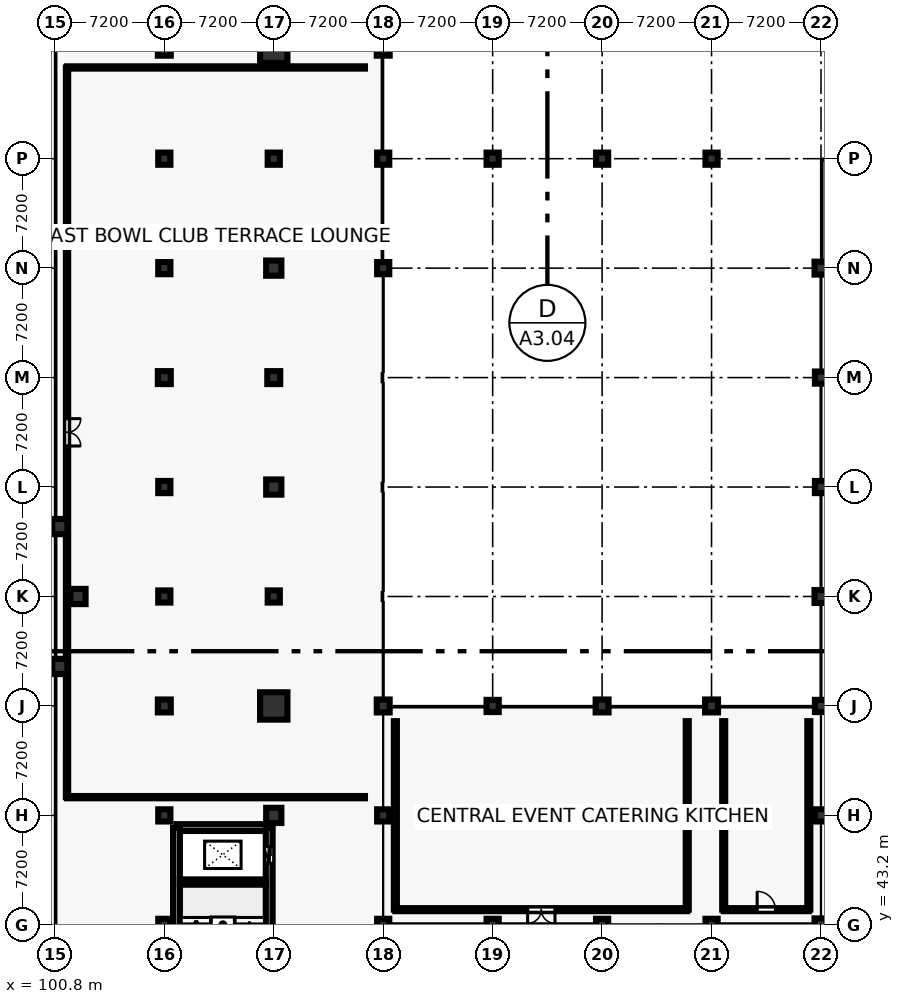
"""IFC4 building model, lengths in metres.
Left out: names, types, materials, properties, quantities, classifications, styles, units other than length and angle.
Written with IfcOpenShell. Run it as: python <this file> out.ifc"""

import sys

from ifc_helpers import new_model, si_unit, direction, frame, frame_2d, origin, origin_2d, place, context, subcontext, project, spatial, rectangle, circle, extrude, element, fill, save


model = new_model("IFC4")
c1 = context("Model", 3, precision=1e-05, world=origin(), true_north=direction((0.0, 1.0)))
c2 = subcontext(c1, "Body", "Model", "MODEL_VIEW")
j1 = project(units=[si_unit("LENGTHUNIT", "METRE"), si_unit("PLANEANGLEUNIT", "RADIAN")], contexts=[c1])
p1 = place(None, origin())
s1 = spatial("IfcSite", under=j1, at=p1, CompositionType="ELEMENT")
p2 = place(p1, origin())
s2 = spatial("IfcBuilding", under=s1, at=p2, CompositionType="ELEMENT")
p3 = place(p2, frame((0.0, 0.0, 5.4)))
s3 = spatial("IfcBuildingStorey", under=s2, at=p3, CompositionType="ELEMENT", Elevation=5.4)
p4 = place(p3, frame((108.0, 43.2, 0.0), z_axis=(0.0, 0.0, 1.0), x_axis=(1.0, 0.0, 0.0)))
e1 = element("IfcColumn", 1, at=p4, inside=s3, PredefinedType="COLUMN", context=c2, shape_type="SweptSolid", body=[
    extrude(rectangle(XDim=0.8, YDim=0.8, at=origin_2d()), origin(), (0.0, 0.0, 1.0), 4.2),
])
p5 = place(p3, frame((108.0, 50.4, 0.0), z_axis=(0.0, 0.0, 1.0), x_axis=(1.0, 0.0, 0.0)))
e2 = element("IfcColumn", 2, at=p5, inside=s3, PredefinedType="COLUMN", context=c2, shape_type="SweptSolid", body=[
    extrude(circle(Radius=0.4, at=origin_2d()), origin(), (0.0, 0.0, 1.0), 4.2),
])
p6 = place(p3, frame((108.0, 57.6, 0.0), z_axis=(0.0, 0.0, 1.0), x_axis=(1.0, 0.0, 0.0)))
e3 = element("IfcColumn", 3, at=p6, inside=s3, PredefinedType="COLUMN", context=c2, shape_type="SweptSolid", body=[
    extrude(rectangle(XDim=0.85, YDim=0.85, at=origin_2d()), origin(), (0.0, 0.0, 1.0), 4.2),
])
p7 = place(p3, frame((108.0, 64.8, 0.0), z_axis=(0.0, 0.0, 1.0), x_axis=(1.0, 0.0, 0.0)))
e4 = element("IfcColumn", 4, at=p7, inside=s3, PredefinedType="COLUMN", context=c2, shape_type="SweptSolid", body=[
    extrude(rectangle(XDim=0.8, YDim=0.8, at=origin_2d()), origin(), (0.0, 0.0, 1.0), 4.2),
])
p8 = place(p3, frame((108.0, 72.0, 0.0), z_axis=(0.0, 0.0, 1.0), x_axis=(1.0, 0.0, 0.0)))
e5 = element("IfcColumn", 5, at=p8, inside=s3, PredefinedType="COLUMN", context=c2, shape_type="SweptSolid", body=[
    extrude(circle(Radius=0.4, at=origin_2d()), origin(), (0.0, 0.0, 1.0), 4.2),
])
p9 = place(p3, frame((108.0, 79.2, 0.0), z_axis=(0.0, 0.0, 1.0), x_axis=(1.0, 0.0, 0.0)))
e6 = element("IfcColumn", 6, at=p9, inside=s3, PredefinedType="COLUMN", context=c2, shape_type="SweptSolid", body=[
    extrude(rectangle(XDim=0.85, YDim=0.85, at=origin_2d()), origin(), (0.0, 0.0, 1.0), 4.2),
])
p10 = place(p3, frame((108.0, 86.4, 0.0), z_axis=(0.0, 0.0, 1.0), x_axis=(1.0, 0.0, 0.0)))
e7 = element("IfcColumn", 7, at=p10, inside=s3, PredefinedType="COLUMN", context=c2, shape_type="SweptSolid", body=[
    extrude(rectangle(XDim=0.8, YDim=0.8, at=origin_2d()), origin(), (0.0, 0.0, 1.0), 4.2),
])
p11 = place(p3, frame((108.0, 93.6, 0.0), z_axis=(0.0, 0.0, 1.0), x_axis=(1.0, 0.0, 0.0)))
e8 = element("IfcColumn", 8, at=p11, inside=s3, PredefinedType="COLUMN", context=c2, shape_type="SweptSolid", body=[
    extrude(circle(Radius=0.4, at=origin_2d()), origin(), (0.0, 0.0, 1.0), 4.2),
])
p12 = place(p3, frame((108.0, 100.8, 0.0), z_axis=(0.0, 0.0, 1.0), x_axis=(1.0, 0.0, 0.0)))
e9 = element("IfcColumn", 9, at=p12, inside=s3, PredefinedType="COLUMN", context=c2, shape_type="SweptSolid", body=[
    extrude(rectangle(XDim=0.85, YDim=0.85, at=origin_2d()), origin(), (0.0, 0.0, 1.0), 4.2),
])
p13 = place(p3, frame((115.2, 50.4, 0.0), z_axis=(0.0, 0.0, 1.0), x_axis=(1.0, 0.0, 0.0)))
e10 = element("IfcColumn", 10, at=p13, inside=s3, PredefinedType="COLUMN", context=c2, shape_type="SweptSolid", body=[
    extrude(circle(Radius=0.5, at=origin_2d()), origin(), (0.0, 0.0, 1.0), 4.2),
])
p14 = place(p3, frame((115.2, 57.6, 0.0), z_axis=(0.0, 0.0, 1.0), x_axis=(1.0, 0.0, 0.0)))
e11 = element("IfcColumn", 11, at=p14, inside=s3, PredefinedType="COLUMN", context=c2, shape_type="SweptSolid", body=[
    extrude(circle(Radius=0.9, at=origin_2d()), origin(), (0.0, 0.0, 1.0), 4.2),
])
p15 = place(p3, frame((115.2, 64.8, 0.0), z_axis=(0.0, 0.0, 1.0), x_axis=(1.0, 0.0, 0.0)))
e12 = element("IfcColumn", 12, at=p15, inside=s3, PredefinedType="COLUMN", context=c2, shape_type="SweptSolid", body=[
    extrude(rectangle(XDim=0.8, YDim=0.8, at=origin_2d()), origin(), (0.0, 0.0, 1.0), 4.2),
])
p16 = place(p3, frame((115.2, 72.0, 0.0), z_axis=(0.0, 0.0, 1.0), x_axis=(1.0, 0.0, 0.0)))
e13 = element("IfcColumn", 13, at=p16, inside=s3, PredefinedType="COLUMN", context=c2, shape_type="SweptSolid", body=[
    extrude(circle(Radius=0.5, at=origin_2d()), origin(), (0.0, 0.0, 1.0), 4.2),
])
p17 = place(p3, frame((115.2, 79.2, 0.0), z_axis=(0.0, 0.0, 1.0), x_axis=(1.0, 0.0, 0.0)))
e14 = element("IfcColumn", 14, at=p17, inside=s3, PredefinedType="COLUMN", context=c2, shape_type="SweptSolid", body=[
    extrude(rectangle(XDim=0.85, YDim=0.85, at=origin_2d()), origin(), (0.0, 0.0, 1.0), 4.2),
])
p18 = place(p3, frame((115.2, 86.4, 0.0), z_axis=(0.0, 0.0, 1.0), x_axis=(1.0, 0.0, 0.0)))
e15 = element("IfcColumn", 15, at=p18, inside=s3, PredefinedType="COLUMN", context=c2, shape_type="SweptSolid", body=[
    extrude(circle(Radius=0.5, at=origin_2d()), origin(), (0.0, 0.0, 1.0), 4.2),
])
p19 = place(p3, frame((115.2, 93.6, 0.0), z_axis=(0.0, 0.0, 1.0), x_axis=(1.0, 0.0, 0.0)))
e16 = element("IfcColumn", 16, at=p19, inside=s3, PredefinedType="COLUMN", context=c2, shape_type="SweptSolid", body=[
    extrude(circle(Radius=0.4, at=origin_2d()), origin(), (0.0, 0.0, 1.0), 4.2),
])
p20 = place(p3, frame((115.2, 100.8, 0.0), z_axis=(0.0, 0.0, 1.0), x_axis=(1.0, 0.0, 0.0)))
e17 = element("IfcColumn", 17, at=p20, inside=s3, PredefinedType="COLUMN", context=c2, shape_type="SweptSolid", body=[
    extrude(circle(Radius=0.9, at=origin_2d()), origin(), (0.0, 0.0, 1.0), 4.2),
])
p21 = place(p3, frame((122.4, 43.2, 0.0), z_axis=(0.0, 0.0, 1.0), x_axis=(1.0, 0.0, 0.0)))
e18 = element("IfcColumn", 18, at=p21, inside=s3, PredefinedType="COLUMN", context=c2, shape_type="SweptSolid", body=[
    extrude(rectangle(XDim=0.8, YDim=0.8, at=origin_2d()), origin(), (0.0, 0.0, 1.0), 4.2),
])
p22 = place(p3, frame((122.4, 50.4, 0.0), z_axis=(0.0, 0.0, 1.0), x_axis=(1.0, 0.0, 0.0)))
e19 = element("IfcColumn", 19, at=p22, inside=s3, PredefinedType="COLUMN", context=c2, shape_type="SweptSolid", body=[
    extrude(circle(Radius=0.4, at=origin_2d()), origin(), (0.0, 0.0, 1.0), 4.2),
])
p23 = place(p3, frame((122.4, 57.6, 0.0), z_axis=(0.0, 0.0, 1.0), x_axis=(1.0, 0.0, 0.0)))
e20 = element("IfcColumn", 20, at=p23, inside=s3, PredefinedType="COLUMN", context=c2, shape_type="SweptSolid", body=[
    extrude(rectangle(XDim=0.85, YDim=0.85, at=origin_2d()), origin(), (0.0, 0.0, 1.0), 4.2),
])
p24 = place(p3, frame((122.4, 86.4, 0.0), z_axis=(0.0, 0.0, 1.0), x_axis=(1.0, 0.0, 0.0)))
e21 = element("IfcColumn", 21, at=p24, inside=s3, PredefinedType="COLUMN", context=c2, shape_type="SweptSolid", body=[
    extrude(rectangle(XDim=0.8, YDim=0.8, at=origin_2d()), origin(), (0.0, 0.0, 1.0), 4.2),
])
p25 = place(p3, frame((122.4, 93.6, 0.0), z_axis=(0.0, 0.0, 1.0), x_axis=(1.0, 0.0, 0.0)))
e22 = element("IfcColumn", 22, at=p25, inside=s3, PredefinedType="COLUMN", context=c2, shape_type="SweptSolid", body=[
    extrude(circle(Radius=0.4, at=origin_2d()), origin(), (0.0, 0.0, 1.0), 4.2),
])
p26 = place(p3, frame((122.4, 100.8, 0.0), z_axis=(0.0, 0.0, 1.0), x_axis=(1.0, 0.0, 0.0)))
e23 = element("IfcColumn", 23, at=p26, inside=s3, PredefinedType="COLUMN", context=c2, shape_type="SweptSolid", body=[
    extrude(rectangle(XDim=0.85, YDim=0.85, at=origin_2d()), origin(), (0.0, 0.0, 1.0), 4.2),
])
p27 = place(p3, frame((129.6, 43.2, 0.0), z_axis=(0.0, 0.0, 1.0), x_axis=(1.0, 0.0, 0.0)))
e24 = element("IfcColumn", 24, at=p27, inside=s3, PredefinedType="COLUMN", context=c2, shape_type="SweptSolid", body=[
    extrude(circle(Radius=0.4, at=origin_2d()), origin(), (0.0, 0.0, 1.0), 4.2),
])
p28 = place(p3, frame((129.6, 50.4, 0.0), z_axis=(0.0, 0.0, 1.0), x_axis=(1.0, 0.0, 0.0)))
e25 = element("IfcColumn", 25, at=p28, inside=s3, PredefinedType="COLUMN", context=c2, shape_type="SweptSolid", body=[
    extrude(rectangle(XDim=0.85, YDim=0.85, at=origin_2d()), origin(), (0.0, 0.0, 1.0), 4.2),
])
p29 = place(p3, frame((129.6, 57.6, 0.0), z_axis=(0.0, 0.0, 1.0), x_axis=(1.0, 0.0, 0.0)))
e26 = element("IfcColumn", 26, at=p29, inside=s3, PredefinedType="COLUMN", context=c2, shape_type="SweptSolid", body=[
    extrude(rectangle(XDim=0.8, YDim=0.8, at=origin_2d()), origin(), (0.0, 0.0, 1.0), 4.2),
])
p30 = place(p3, frame((129.6, 93.6, 0.0), z_axis=(0.0, 0.0, 1.0), x_axis=(1.0, 0.0, 0.0)))
e27 = element("IfcColumn", 27, at=p30, inside=s3, PredefinedType="COLUMN", context=c2, shape_type="SweptSolid", body=[
    extrude(circle(Radius=0.4, at=origin_2d()), origin(), (0.0, 0.0, 1.0), 6.0),
])
p31 = place(p3, frame((136.8, 43.2, 0.0), z_axis=(0.0, 0.0, 1.0), x_axis=(1.0, 0.0, 0.0)))
e28 = element("IfcColumn", 28, at=p31, inside=s3, PredefinedType="COLUMN", context=c2, shape_type="SweptSolid", body=[
    extrude(rectangle(XDim=0.8, YDim=0.8, at=origin_2d()), origin(), (0.0, 0.0, 1.0), 4.2),
])
p32 = place(p3, frame((136.8, 50.4, 0.0), z_axis=(0.0, 0.0, 1.0), x_axis=(1.0, 0.0, 0.0)))
e29 = element("IfcColumn", 29, at=p32, inside=s3, PredefinedType="COLUMN", context=c2, shape_type="SweptSolid", body=[
    extrude(circle(Radius=0.4, at=origin_2d()), origin(), (0.0, 0.0, 1.0), 4.2),
])
p33 = place(p3, frame((136.8, 57.6, 0.0), z_axis=(0.0, 0.0, 1.0), x_axis=(1.0, 0.0, 0.0)))
e30 = element("IfcColumn", 30, at=p33, inside=s3, PredefinedType="COLUMN", context=c2, shape_type="SweptSolid", body=[
    extrude(rectangle(XDim=0.85, YDim=0.85, at=origin_2d()), origin(), (0.0, 0.0, 1.0), 4.2),
])
p34 = place(p3, frame((136.8, 93.6, 0.0), z_axis=(0.0, 0.0, 1.0), x_axis=(1.0, 0.0, 0.0)))
e31 = element("IfcColumn", 31, at=p34, inside=s3, PredefinedType="COLUMN", context=c2, shape_type="SweptSolid", body=[
    extrude(rectangle(XDim=0.8, YDim=0.8, at=origin_2d()), origin(), (0.0, 0.0, 1.0), 6.0),
])
p35 = place(p3, frame((144.0, 43.2, 0.0), z_axis=(0.0, 0.0, 1.0), x_axis=(1.0, 0.0, 0.0)))
e32 = element("IfcColumn", 32, at=p35, inside=s3, PredefinedType="COLUMN", context=c2, shape_type="SweptSolid", body=[
    extrude(rectangle(XDim=0.8, YDim=0.8, at=origin_2d()), origin(), (0.0, 0.0, 1.0), 4.2),
])
p36 = place(p3, frame((144.0, 50.4, 0.0), z_axis=(0.0, 0.0, 1.0), x_axis=(1.0, 0.0, 0.0)))
e33 = element("IfcColumn", 33, at=p36, inside=s3, PredefinedType="COLUMN", context=c2, shape_type="SweptSolid", body=[
    extrude(circle(Radius=0.4, at=origin_2d()), origin(), (0.0, 0.0, 1.0), 4.2),
])
p37 = place(p3, frame((144.0, 57.6, 0.0), z_axis=(0.0, 0.0, 1.0), x_axis=(1.0, 0.0, 0.0)))
e34 = element("IfcColumn", 34, at=p37, inside=s3, PredefinedType="COLUMN", context=c2, shape_type="SweptSolid", body=[
    extrude(rectangle(XDim=0.85, YDim=0.85, at=origin_2d()), origin(), (0.0, 0.0, 1.0), 4.2),
])
p38 = place(p3, frame((144.0, 93.6, 0.0), z_axis=(0.0, 0.0, 1.0), x_axis=(1.0, 0.0, 0.0)))
e35 = element("IfcColumn", 35, at=p38, inside=s3, PredefinedType="COLUMN", context=c2, shape_type="SweptSolid", body=[
    extrude(rectangle(XDim=0.8, YDim=0.8, at=origin_2d()), origin(), (0.0, 0.0, 1.0), 6.0),
])
p39 = place(p3, frame((151.2, 43.2, 0.0), z_axis=(0.0, 0.0, 1.0), x_axis=(1.0, 0.0, 0.0)))
e36 = element("IfcColumn", 36, at=p39, inside=s3, PredefinedType="COLUMN", context=c2, shape_type="SweptSolid", body=[
    extrude(rectangle(XDim=0.85, YDim=0.85, at=origin_2d()), origin(), (0.0, 0.0, 1.0), 4.2),
])
p40 = place(p3, frame((151.2, 50.4, 0.0), z_axis=(0.0, 0.0, 1.0), x_axis=(1.0, 0.0, 0.0)))
e37 = element("IfcColumn", 37, at=p40, inside=s3, PredefinedType="COLUMN", context=c2, shape_type="SweptSolid", body=[
    extrude(rectangle(XDim=0.8, YDim=0.8, at=origin_2d()), origin(), (0.0, 0.0, 1.0), 4.2),
])
p41 = place(p3, frame((151.2, 57.6, 0.0), z_axis=(0.0, 0.0, 1.0), x_axis=(1.0, 0.0, 0.0)))
e38 = element("IfcColumn", 38, at=p41, inside=s3, PredefinedType="COLUMN", context=c2, shape_type="SweptSolid", body=[
    extrude(circle(Radius=0.4, at=origin_2d()), origin(), (0.0, 0.0, 1.0), 4.2),
])
p42 = place(p3, frame((151.2, 64.8, 0.0), z_axis=(0.0, 0.0, 1.0), x_axis=(1.0, 0.0, 0.0)))
e39 = element("IfcColumn", 39, at=p42, inside=s3, PredefinedType="COLUMN", context=c2, shape_type="SweptSolid", body=[
    extrude(rectangle(XDim=0.85, YDim=0.85, at=origin_2d()), origin(), (0.0, 0.0, 1.0), 4.2),
])
p43 = place(p3, frame((151.2, 72.0, 0.0), z_axis=(0.0, 0.0, 1.0), x_axis=(1.0, 0.0, 0.0)))
e40 = element("IfcColumn", 40, at=p43, inside=s3, PredefinedType="COLUMN", context=c2, shape_type="SweptSolid", body=[
    extrude(rectangle(XDim=0.8, YDim=0.8, at=origin_2d()), origin(), (0.0, 0.0, 1.0), 4.2),
])
p44 = place(p3, frame((151.2, 79.2, 0.0), z_axis=(0.0, 0.0, 1.0), x_axis=(1.0, 0.0, 0.0)))
e41 = element("IfcColumn", 41, at=p44, inside=s3, PredefinedType="COLUMN", context=c2, shape_type="SweptSolid", body=[
    extrude(circle(Radius=0.4, at=origin_2d()), origin(), (0.0, 0.0, 1.0), 4.2),
])
p45 = place(p3, frame((151.2, 86.4, 0.0), z_axis=(0.0, 0.0, 1.0), x_axis=(1.0, 0.0, 0.0)))
e42 = element("IfcColumn", 42, at=p45, inside=s3, PredefinedType="COLUMN", context=c2, shape_type="SweptSolid", body=[
    extrude(rectangle(XDim=0.85, YDim=0.85, at=origin_2d()), origin(), (0.0, 0.0, 1.0), 4.2),
])
p46 = place(p3, frame((108.8, 49.6, 0.0), z_axis=(0.0, 0.0, 1.0), x_axis=(1.0, 0.0, 0.0)))
e43 = element("IfcWall", 43, at=p46, inside=s3, PredefinedType="SHEAR", context=c2, shape_type="SweptSolid", body=[
    extrude(rectangle(XDim=6.1, YDim=0.45, at=frame_2d((3.05, 0.0))), origin(), (0.0, 0.0, 1.0), 3.92),
])
p47 = place(p3, frame((108.8, 36.8, 0.0), z_axis=(0.0, 0.0, 1.0), x_axis=(0.0, 1.0, 0.0)))
e44 = element("IfcWall", 44, at=p47, inside=s3, PredefinedType="SHEAR", context=c2, shape_type="SweptSolid", body=[
    extrude(rectangle(XDim=12.8, YDim=0.45, at=frame_2d((6.4, 0.0))), origin(), (0.0, 0.0, 1.0), 3.92),
])
p48 = place(p3, frame((114.9, 36.8, 0.0), z_axis=(0.0, 0.0, 1.0), x_axis=(0.0, 1.0, 0.0)))
e45 = element("IfcWall", 45, at=p48, inside=s3, PredefinedType="SHEAR", context=c2, shape_type="SweptSolid", body=[
    extrude(rectangle(XDim=12.8, YDim=0.45, at=frame_2d((6.4, 0.0))), origin(), (0.0, 0.0, 1.0), 3.92),
])
p49 = place(p48, frame((0.55, 0.0, 0.0)))
e46 = element("IfcOpeningElement", 46, at=p49, cuts=e45, PredefinedType="OPENING", context=c2, shape_type="SweptSolid", body=[
    extrude(rectangle(XDim=1.2, YDim=2.25, at=frame_2d((0.6, 1.125))), frame((0.0, 0.235, 0.0), z_axis=(0.0, -1.0, 0.0), x_axis=(1.0, 0.0, 0.0)), (0.0, 0.0, 1.0), 0.47),
])
p50 = place(p48, frame((10.458, 0.0, 0.0)))
e47 = element("IfcOpeningElement", 47, at=p50, cuts=e45, PredefinedType="OPENING", context=c2, shape_type="SweptSolid", body=[
    extrude(rectangle(XDim=1.1, YDim=2.2, at=frame_2d((0.55, 1.1))), frame((0.0, 0.235, 0.0), z_axis=(0.0, -1.0, 0.0), x_axis=(1.0, 0.0, 0.0)), (0.0, 0.0, 1.0), 0.47),
])
p51 = place(p3, frame((109.025, 46.016, 0.0), z_axis=(0.0, 0.0, 1.0), x_axis=(1.0, 0.0, 0.0)))
e48 = element("IfcWall", 48, at=p51, inside=s3, PredefinedType="SHEAR", context=c2, shape_type="SweptSolid", body=[
    extrude(rectangle(XDim=5.65, YDim=0.35, at=frame_2d((2.825, 0.0))), origin(), (0.0, 0.0, 1.0), 3.92),
])
for number, where, z_axis, x_axis in (
    (49, (102.32, 64.8, 0.0), (0.0, 0.0, 1.0), (1.0, 0.0, 0.0)),
    (50, (101.125, 69.401, 0.0), (0.0, 0.0, 1.0), (1.0, 0.0, 0.0)),
    (51, (101.125, 60.199, 0.0), (0.0, 0.0, 1.0), (1.0, 0.0, 0.0)),
):
    element("IfcColumn", number, at=place(p3, frame(where, z_axis=z_axis, x_axis=x_axis)), inside=s3, PredefinedType="COLUMN", context=c2, shape_type="SweptSolid", body=[
        extrude(circle(Radius=0.5, at=origin_2d()), origin(), (0.0, 0.0, 1.0), 4.2),
    ])
for number, where, z_axis, x_axis in (
    (52, (101.6, 51.6, 0.0), (0.0, 0.0, 1.0), (1.0, 0.0, 0.0)),
    (53, (121.2, 99.6, 0.0), (0.0, 0.0, 1.0), (-1.0, 0.0, 0.0)),
):
    element("IfcWall", number, at=place(p3, frame(where, z_axis=z_axis, x_axis=x_axis)), inside=s3, PredefinedType="PARTITIONING", context=c2, shape_type="SweptSolid", body=[
        extrude(rectangle(XDim=19.6, YDim=0.15, at=frame_2d((9.8, 0.0))), origin(), (0.0, 0.0, 1.0), 2.98),
    ])
p52 = place(p3, frame((101.6, 99.6, 0.0), z_axis=(0.0, 0.0, 1.0), x_axis=(0.0, -1.0, 0.0)))
e54 = element("IfcWall", 54, at=p52, inside=s3, PredefinedType="PARTITIONING", context=c2, shape_type="SweptSolid", body=[
    extrude(rectangle(XDim=48.0, YDim=0.15, at=frame_2d((24.0, 0.0))), origin(), (0.0, 0.0, 1.0), 2.98),
])
p53 = place(p52, frame((23.1, 0.0, 0.0)))
e55 = element("IfcOpeningElement", 55, at=p53, cuts=e54, PredefinedType="OPENING", context=c2, shape_type="SweptSolid", body=[
    extrude(rectangle(XDim=1.8, YDim=2.3, at=frame_2d((0.9, 1.15))), frame((0.0, 0.085, 0.0), z_axis=(0.0, -1.0, 0.0), x_axis=(1.0, 0.0, 0.0)), (0.0, 0.0, 1.0), 0.17),
])
p54 = place(p3, frame((123.2, 44.2, 0.0), z_axis=(0.0, 0.0, 1.0), x_axis=(1.0, 0.0, 0.0)))
e56 = element("IfcWall", 56, at=p54, inside=s3, PredefinedType="PARTITIONING", context=c2, shape_type="SweptSolid", body=[
    extrude(rectangle(XDim=19.2, YDim=0.2, at=frame_2d((9.6, 0.0))), origin(), (0.0, 0.0, 1.0), 2.98),
])
p55 = place(p54, frame((8.7, 0.0, 0.0)))
e57 = element("IfcOpeningElement", 57, at=p55, cuts=e56, PredefinedType="OPENING", context=c2, shape_type="SweptSolid", body=[
    extrude(rectangle(XDim=1.8, YDim=2.3, at=frame_2d((0.9, 1.15))), frame((0.0, 0.11, 0.0), z_axis=(0.0, -1.0, 0.0), x_axis=(1.0, 0.0, 0.0)), (0.0, 0.0, 1.0), 0.22),
])
for number, where, z_axis, x_axis in (
    (58, (142.4, 44.2, 0.0), (0.0, 0.0, 1.0), (0.0, 1.0, 0.0)),
    (59, (123.2, 56.6, 0.0), (0.0, 0.0, 1.0), (0.0, -1.0, 0.0)),
):
    element("IfcWall", number, at=place(p3, frame(where, z_axis=z_axis, x_axis=x_axis)), inside=s3, PredefinedType="PARTITIONING", context=c2, shape_type="SweptSolid", body=[
        extrude(rectangle(XDim=12.4, YDim=0.2, at=frame_2d((6.2, 0.0))), origin(), (0.0, 0.0, 1.0), 2.98),
    ])
p56 = place(p3, frame((144.8, 44.2, 0.0), z_axis=(0.0, 0.0, 1.0), x_axis=(1.0, 0.0, 0.0)))
e60 = element("IfcWall", 60, at=p56, inside=s3, PredefinedType="PARTITIONING", context=c2, shape_type="SweptSolid", body=[
    extrude(rectangle(XDim=5.6, YDim=0.2, at=frame_2d((2.8, 0.0))), origin(), (0.0, 0.0, 1.0), 2.98),
])
p57 = place(p56, frame((2.2, 0.0, 0.0)))
e61 = element("IfcOpeningElement", 61, at=p57, cuts=e60, PredefinedType="OPENING", context=c2, shape_type="SweptSolid", body=[
    extrude(rectangle(XDim=1.2, YDim=2.25, at=frame_2d((0.6, 1.125))), frame((0.0, 0.11, 0.0), z_axis=(0.0, -1.0, 0.0), x_axis=(1.0, 0.0, 0.0)), (0.0, 0.0, 1.0), 0.22),
])
for number, where, z_axis, x_axis in (
    (62, (150.4, 44.2, 0.0), (0.0, 0.0, 1.0), (0.0, 1.0, 0.0)),
    (63, (144.8, 56.6, 0.0), (0.0, 0.0, 1.0), (0.0, -1.0, 0.0)),
):
    element("IfcWall", number, at=place(p3, frame(where, z_axis=z_axis, x_axis=x_axis)), inside=s3, PredefinedType="PARTITIONING", context=c2, shape_type="SweptSolid", body=[
        extrude(rectangle(XDim=12.4, YDim=0.2, at=frame_2d((6.2, 0.0))), origin(), (0.0, 0.0, 1.0), 2.98),
    ])
p58 = place(p50, origin())
e64 = element("IfcDoor", 64, at=p58, inside=s3, OperationType="SLIDING_TO_RIGHT", PredefinedType="DOOR", context=c2, shape_type="SweptSolid", body=[
    extrude(rectangle(XDim=1.1, YDim=2.2, at=frame_2d((0.55, 1.1))), frame((0.0, 0.025, 0.0), z_axis=(0.0, -1.0, 0.0), x_axis=(1.0, 0.0, 0.0)), (0.0, 0.0, 1.0), 0.05),
])
fill(e47, e64)
p59 = place(p53, origin())
e65 = element("IfcDoor", 65, at=p59, inside=s3, OperationType="DOUBLE_DOOR_SINGLE_SWING", PredefinedType="DOOR", context=c2, shape_type="SweptSolid", body=[
    extrude(rectangle(XDim=1.8, YDim=2.3, at=frame_2d((0.9, 1.15))), frame((0.0, 0.025, 0.0), z_axis=(0.0, -1.0, 0.0), x_axis=(1.0, 0.0, 0.0)), (0.0, 0.0, 1.0), 0.05),
])
fill(e55, e65)
p60 = place(p55, frame((1.8, 0.0, 0.0), z_axis=(0.0, 0.0, 1.0), x_axis=(-1.0, 0.0, 0.0)))
e66 = element("IfcDoor", 66, at=p60, inside=s3, OperationType="DOUBLE_DOOR_SINGLE_SWING", PredefinedType="DOOR", context=c2, shape_type="SweptSolid", body=[
    extrude(rectangle(XDim=1.8, YDim=2.3, at=frame_2d((0.9, 1.15))), frame((0.0, 0.025, 0.0), z_axis=(0.0, -1.0, 0.0), x_axis=(1.0, 0.0, 0.0)), (0.0, 0.0, 1.0), 0.05),
])
fill(e57, e66)
p61 = place(p57, origin())
e67 = element("IfcDoor", 67, at=p61, inside=s3, OperationType="SINGLE_SWING_LEFT", PredefinedType="DOOR", context=c2, shape_type="SweptSolid", body=[
    extrude(rectangle(XDim=1.2, YDim=2.25, at=frame_2d((0.6, 1.125))), frame((0.0, 0.025, 0.0), z_axis=(0.0, -1.0, 0.0), x_axis=(1.0, 0.0, 0.0)), (0.0, 0.0, 1.0), 0.05),
])
fill(e61, e67)
save(model, sys.argv[1])
